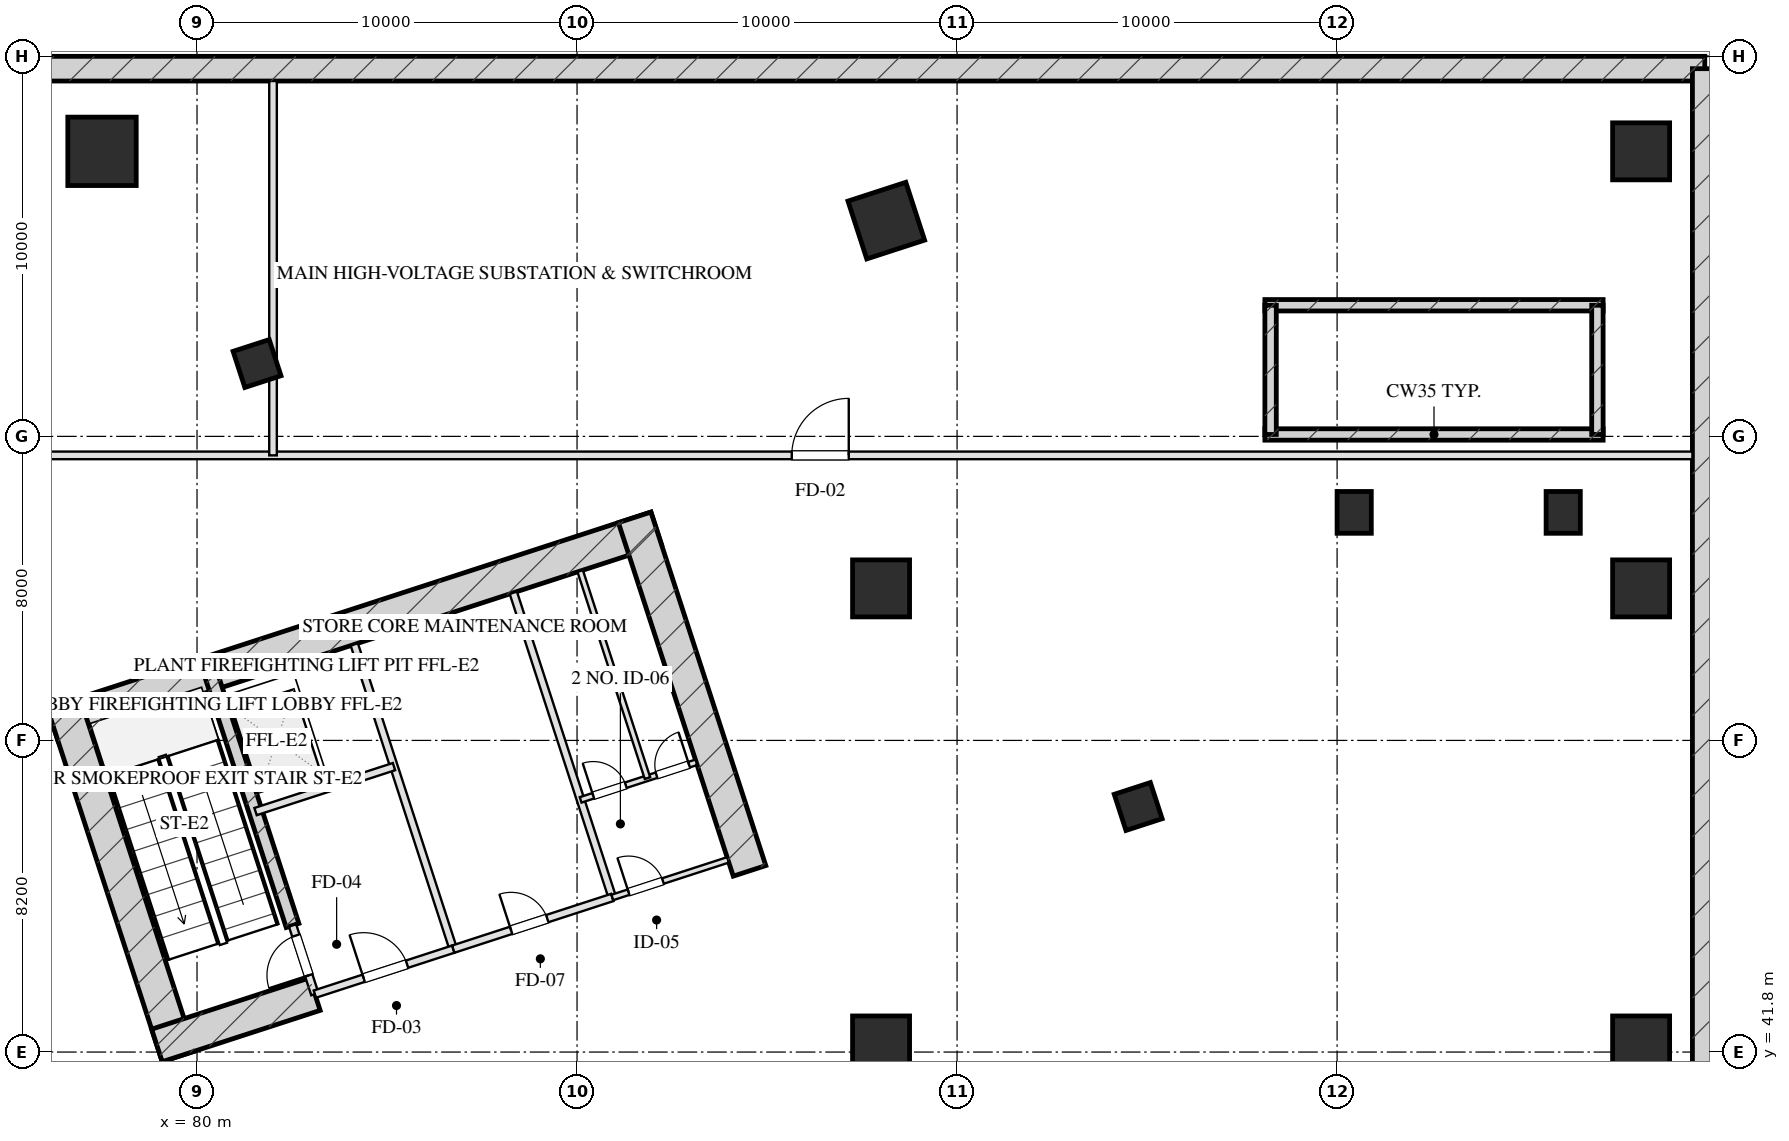
"""IFC4 building model, lengths in metres.
Left out: names, types, materials, properties, quantities, classifications, styles, units other than length and angle.
Written with IfcOpenShell. Run it as: python <this file> out.ifc"""

import sys

from ifc_helpers import new_model, si_unit, direction, frame, frame_2d, origin, origin_2d, place, context, subcontext, project, spatial, rectangle, hollow_rectangle, extrude, element, fill, save


model = new_model("IFC4")
c1 = context("Model", 3, precision=1e-05, world=origin(), true_north=direction((0.0, 1.0)))
c2 = subcontext(c1, "Body", "Model", "MODEL_VIEW")
j1 = project(units=[si_unit("LENGTHUNIT", "METRE"), si_unit("PLANEANGLEUNIT", "RADIAN")], contexts=[c1])
p1 = place(None, origin())
s1 = spatial("IfcSite", under=j1, at=p1, CompositionType="ELEMENT")
p2 = place(p1, origin())
s2 = spatial("IfcBuilding", under=s1, at=p2, CompositionType="ELEMENT")
p3 = place(p2, frame((0.0, 0.0, -12.0)))
s3 = spatial("IfcBuildingStorey", under=s2, at=p3, CompositionType="ELEMENT", Elevation=-12.0)
p4 = place(p3, frame((76.201, 50.419, 0.0), z_axis=(0.0, 0.0, 1.0), x_axis=(0.951056412142, 0.309017314926, 0.0)))
e1 = element("IfcWall", 1, at=p4, inside=s3, PredefinedType="SHEAR", context=c2, shape_type="SweptSolid", body=[
    extrude(rectangle(XDim=16.7, YDim=0.9, at=frame_2d((8.35, 0.0))), origin(), (0.0, 0.0, 1.0), 6.0),
])
for number, where, z_axis, x_axis in (
    (2, (79.512, 41.685, 0.0), (0.0, 0.0, 1.0), (-0.309, 0.951, 0.0)),
    (3, (94.539, 46.568, 0.0), (0.0, 0.0, 1.0), (-0.309, 0.951, 0.0)),
):
    element("IfcWall", number, at=place(p3, frame(where, z_axis=z_axis, x_axis=x_axis)), inside=s3, PredefinedType="SHEAR", context=c2, shape_type="SweptSolid", body=[
        extrude(rectangle(XDim=9.78, YDim=0.9, at=frame_2d((4.89, 0.0))), origin(), (0.0, 0.0, 1.0), 6.0),
    ])
p5 = place(p3, frame((82.514, 45.131, 0.0), z_axis=(0.0, 0.0, 1.0), x_axis=(-0.308988790936, 0.951065679686, 0.0)))
e4 = element("IfcWall", 4, at=p5, inside=s3, PredefinedType="SHEAR", context=c2, shape_type="SweptSolid", body=[
    extrude(rectangle(XDim=6.98, YDim=0.35, at=frame_2d((3.49, 0.0))), origin(), (0.0, 0.0, 1.0), 6.0),
])
p6 = place(p3, frame((78.945, 41.974, 0.0), z_axis=(0.0, 0.0, 1.0), x_axis=(0.951058289404, 0.309011537255, 0.0)))
e5 = element("IfcWall", 5, at=p6, inside=s3, PredefinedType="SHEAR", context=c2, shape_type="SweptSolid", body=[
    extrude(rectangle(XDim=4.37, YDim=0.9, at=frame_2d((2.185, 0.0))), origin(), (0.0, 0.0, 1.0), 6.0),
])
for number, where, z_axis, x_axis in (
    (6, (108.1, 58.05, 0.0), (0.0, 0.0, 1.0), (1.0, 0.0, 0.0)),
    (7, (108.1, 61.45, 0.0), (0.0, 0.0, 1.0), (1.0, 0.0, 0.0)),
):
    element("IfcWall", number, at=place(p3, frame(where, z_axis=z_axis, x_axis=x_axis)), inside=s3, PredefinedType="SHEAR", context=c2, shape_type="SweptSolid", body=[
        extrude(rectangle(XDim=8.9, YDim=0.3, at=frame_2d((4.45, 0.0))), origin(), (0.0, 0.0, 1.0), 6.0),
    ])
for number, where, z_axis, x_axis in (
    (8, (116.85, 58.05, 0.0), (0.0, 0.0, 1.0), (0.0, 1.0, 0.0)),
    (9, (108.25, 58.05, 0.0), (0.0, 0.0, 1.0), (0.0, 1.0, 0.0)),
):
    element("IfcWall", number, at=place(p3, frame(where, z_axis=z_axis, x_axis=x_axis)), inside=s3, PredefinedType="SHEAR", context=c2, shape_type="SweptSolid", body=[
        extrude(rectangle(XDim=3.4, YDim=0.3, at=frame_2d((1.7, 0.0))), origin(), (0.0, 0.0, 1.0), 6.0),
    ])
p7 = place(p3, frame((0.325, 67.675, 0.0), z_axis=(0.0, 0.0, 1.0), x_axis=(1.0, 0.0, 0.0)))
e10 = element("IfcWall", 10, at=p7, inside=s3, PredefinedType="SHEAR", context=c2, shape_type="SweptSolid", body=[
    extrude(rectangle(XDim=119.35, YDim=0.65, at=frame_2d((59.675, 0.0))), origin(), (0.0, 0.0, 1.0), 6.0),
])
p8 = place(p3, frame((119.675, 0.325, 0.0), z_axis=(0.0, 0.0, 1.0), x_axis=(0.0, 1.0, 0.0)))
e11 = element("IfcWall", 11, at=p8, inside=s3, PredefinedType="SHEAR", context=c2, shape_type="SweptSolid", body=[
    extrude(rectangle(XDim=67.35, YDim=0.65, at=frame_2d((33.675, 0.0))), origin(), (0.0, 0.0, 1.0), 6.0),
])
for number, where, z_axis, x_axis in (
    (12, (110.45, 56.0, 0.0), (0.0, 0.0, 1.0), (1.0, 0.0, 0.0)),
    (13, (115.95, 56.0, 0.0), (0.0, 0.0, 1.0), (1.0, 0.0, 0.0)),
):
    element("IfcColumn", number, at=place(p3, frame(where, z_axis=z_axis, x_axis=x_axis)), inside=s3, PredefinedType="COLUMN", context=c2, shape_type="SweptSolid", body=[
        extrude(rectangle(XDim=0.9, YDim=1.1, at=origin_2d()), origin(), (0.0, 0.0, 1.0), 5.65),
    ])
p9 = place(p3, frame((77.5, 65.5, 0.0), z_axis=(0.0, 0.0, 1.0), x_axis=(1.0, 0.0, 0.0)))
e14 = element("IfcColumn", 14, at=p9, inside=s3, PredefinedType="COLUMN", context=c2, shape_type="SweptSolid", body=[
    extrude(hollow_rectangle(XDim=1.8, YDim=1.8, WallThickness=0.06, at=origin_2d()), origin(), (0.0, 0.0, 1.0), 6.001),
])
for number, where, z_axis, x_axis in (
    (15, (98.0, 42.0, 0.0), (0.0, 0.0, 1.0), (1.0, 0.0, 0.0)),
    (16, (98.0, 54.0, 0.0), (0.0, 0.0, 1.0), (1.0, 0.0, 0.0)),
    (17, (118.0, 42.0, 0.0), (0.0, 0.0, 1.0), (1.0, 0.0, 0.0)),
    (18, (118.0, 54.0, 0.0), (0.0, 0.0, 1.0), (1.0, 0.0, 0.0)),
    (19, (118.0, 65.5, 0.0), (0.0, 0.0, 1.0), (1.0, 0.0, 0.0)),
):
    element("IfcColumn", number, at=place(p3, frame(where, z_axis=z_axis, x_axis=x_axis)), inside=s3, PredefinedType="COLUMN", context=c2, shape_type="SweptSolid", body=[
        extrude(rectangle(XDim=1.5, YDim=1.5, at=origin_2d()), origin(), (0.0, 0.0, 1.0), 6.001),
    ])
p10 = place(p3, frame((98.137, 63.677, 0.0), z_axis=(0.0, 0.0, 1.0), x_axis=(0.951056516295, 0.309016994375, 0.0)))
e20 = element("IfcColumn", 20, at=p10, inside=s3, PredefinedType="COLUMN", context=c2, shape_type="SweptSolid", body=[
    extrude(hollow_rectangle(XDim=1.6, YDim=1.6, WallThickness=0.055, at=origin_2d()), origin(), (0.0, 0.0, 1.0), 6.001),
])
for number, where, z_axis, x_axis in (
    (21, (104.766, 48.261, 0.0), (0.0, 0.0, 1.0), (0.951, 0.309, 0.0)),
    (22, (81.579, 59.916, 0.0), (0.0, 0.0, 1.0), (0.951, 0.309, 0.0)),
):
    element("IfcColumn", number, at=place(p3, frame(where, z_axis=z_axis, x_axis=x_axis)), inside=s3, PredefinedType="COLUMN", context=c2, shape_type="SweptSolid", body=[
        extrude(hollow_rectangle(XDim=1.0, YDim=1.0, WallThickness=0.036, at=origin_2d()), origin(), (0.0, 0.0, 1.0), 6.001),
    ])
p11 = place(p3, frame((83.101, 43.324, 0.0), z_axis=(0.0, 0.0, 1.0), x_axis=(-0.309048298632, 0.951046344356, 0.0)))
e23 = element("IfcWall", 23, at=p11, inside=s3, PredefinedType="PARTITIONING", context=c2, shape_type="SweptSolid", body=[
    extrude(rectangle(XDim=1.9, YDim=0.2, at=frame_2d((0.95, 0.0))), origin(), (0.0, 0.0, 1.0), 5.635),
])
p12 = place(p11, frame((0.52, 0.0, 0.0)))
e24 = element("IfcOpeningElement", 24, at=p12, cuts=e23, PredefinedType="OPENING", context=c2, shape_type="SweptSolid", body=[
    extrude(rectangle(XDim=1.1, YDim=2.05, at=frame_2d((0.55, 1.025))), frame((0.0, 0.11, 0.0), z_axis=(0.0, -1.0, 0.0), x_axis=(1.0, 0.0, 0.0)), (0.0, 0.0, 1.0), 0.22),
])
p13 = place(p3, frame((86.743, 44.508, 0.0), z_axis=(0.0, 0.0, 1.0), x_axis=(-0.309016001439, 0.951056838919, 0.0)))
e25 = element("IfcWall", 25, at=p13, inside=s3, PredefinedType="PARTITIONING", context=c2, shape_type="SweptSolid", body=[
    extrude(rectangle(XDim=8.43, YDim=0.2, at=frame_2d((4.215, 0.0))), origin(), (0.0, 0.0, 1.0), 5.635),
])
p14 = place(p3, frame((83.101, 43.324, 0.0), z_axis=(0.0, 0.0, 1.0), x_axis=(0.951052804469, 0.309028417967, 0.0)))
e26 = element("IfcWall", 26, at=p14, inside=s3, PredefinedType="PARTITIONING", context=c2, shape_type="SweptSolid", body=[
    extrude(rectangle(XDim=3.83, YDim=0.2, at=frame_2d((1.915, 0.0))), origin(), (0.0, 0.0, 1.0), 5.635),
])
p15 = place(p14, frame((1.35, 0.0, 0.0)))
e27 = element("IfcOpeningElement", 27, at=p15, cuts=e26, PredefinedType="OPENING", context=c2, shape_type="SweptSolid", body=[
    extrude(rectangle(XDim=1.2, YDim=2.05, at=frame_2d((0.6, 1.025))), frame((0.0, 0.11, 0.0), z_axis=(0.0, -1.0, 0.0), x_axis=(1.0, 0.0, 0.0)), (0.0, 0.0, 1.0), 0.22),
])
p16 = place(p3, frame((81.54, 48.127, 0.0), z_axis=(0.0, 0.0, 1.0), x_axis=(0.951062257173, 0.308999325213, 0.0)))
e28 = element("IfcWall", 28, at=p16, inside=s3, PredefinedType="PARTITIONING", context=c2, shape_type="SweptSolid", body=[
    extrude(rectangle(XDim=2.1, YDim=0.2, at=frame_2d((1.05, 0.0))), origin(), (0.0, 0.0, 1.0), 5.635),
])
p17 = place(p3, frame((83.538, 48.776, 0.0), z_axis=(0.0, 0.0, 1.0), x_axis=(0.951041328149, 0.309063734775, 0.0)))
e29 = element("IfcWall", 29, at=p17, inside=s3, PredefinedType="PARTITIONING", context=c2, shape_type="SweptSolid", body=[
    extrude(rectangle(XDim=1.73, YDim=0.2, at=frame_2d((0.865, 0.0))), origin(), (0.0, 0.0, 1.0), 5.635),
])
p18 = place(p3, frame((90.928, 45.868, 0.0), z_axis=(0.0, 0.0, 1.0), x_axis=(-0.309042196757, 0.951048327176, 0.0)))
e30 = element("IfcWall", 30, at=p18, inside=s3, PredefinedType="PARTITIONING", context=c2, shape_type="SweptSolid", body=[
    extrude(rectangle(XDim=8.43, YDim=0.2, at=frame_2d((4.215, 0.0))), origin(), (0.0, 0.0, 1.0), 5.635),
])
p19 = place(p3, frame((86.743, 44.508, 0.0), z_axis=(0.0, 0.0, 1.0), x_axis=(0.951063829732, 0.308994485023, 0.0)))
e31 = element("IfcWall", 31, at=p19, inside=s3, PredefinedType="PARTITIONING", context=c2, shape_type="SweptSolid", body=[
    extrude(rectangle(XDim=4.4, YDim=0.2, at=frame_2d((2.2, 0.0))), origin(), (0.0, 0.0, 1.0), 5.635),
])
p20 = place(p19, frame((1.6, 0.0, 0.0)))
e32 = element("IfcOpeningElement", 32, at=p20, cuts=e31, PredefinedType="OPENING", context=c2, shape_type="SweptSolid", body=[
    extrude(rectangle(XDim=1.0, YDim=2.05, at=frame_2d((0.5, 1.025))), frame((0.0, 0.11, 0.0), z_axis=(0.0, -1.0, 0.0), x_axis=(1.0, 0.0, 0.0)), (0.0, 0.0, 1.0), 0.22),
])
p21 = place(p3, frame((90.928, 45.868, 0.0), z_axis=(0.0, 0.0, 1.0), x_axis=(0.951059297078, 0.309008435874, 0.0)))
e33 = element("IfcWall", 33, at=p21, inside=s3, PredefinedType="PARTITIONING", context=c2, shape_type="SweptSolid", body=[
    extrude(rectangle(XDim=3.2, YDim=0.15, at=frame_2d((1.6, 0.0))), origin(), (0.0, 0.0, 1.0), 5.635),
])
p22 = place(p21, frame((0.45, 0.0, 0.0)))
e34 = element("IfcOpeningElement", 34, at=p22, cuts=e33, PredefinedType="OPENING", context=c2, shape_type="SweptSolid", body=[
    extrude(rectangle(XDim=0.95, YDim=2.05, at=frame_2d((0.475, 1.025))), frame((0.0, 0.085, 0.0), z_axis=(0.0, -1.0, 0.0), x_axis=(1.0, 0.0, 0.0)), (0.0, 0.0, 1.0), 0.17),
])
p23 = place(p3, frame((90.094, 48.436, 0.0), z_axis=(0.0, 0.0, 1.0), x_axis=(0.951066581729, 0.308986014439, 0.0)))
e35 = element("IfcWall", 35, at=p23, inside=s3, PredefinedType="PARTITIONING", context=c2, shape_type="SweptSolid", body=[
    extrude(rectangle(XDim=3.2, YDim=0.15, at=frame_2d((1.6, 0.0))), origin(), (0.0, 0.0, 1.0), 5.635),
])
p24 = place(p23, frame((0.35, 0.0, 0.0)))
e36 = element("IfcOpeningElement", 36, at=p24, cuts=e35, PredefinedType="OPENING", context=c2, shape_type="SweptSolid", body=[
    extrude(rectangle(XDim=0.9, YDim=2.05, at=frame_2d((0.45, 1.025))), frame((0.0, 0.085, 0.0), z_axis=(0.0, -1.0, 0.0), x_axis=(1.0, 0.0, 0.0)), (0.0, 0.0, 1.0), 0.17),
])
p25 = place(p23, frame((2.1, 0.0, 0.0)))
e37 = element("IfcOpeningElement", 37, at=p25, cuts=e35, PredefinedType="OPENING", context=c2, shape_type="SweptSolid", body=[
    extrude(rectangle(XDim=0.9, YDim=2.05, at=frame_2d((0.45, 1.025))), frame((0.0, 0.085, 0.0), z_axis=(0.0, -1.0, 0.0), x_axis=(1.0, 0.0, 0.0)), (0.0, 0.0, 1.0), 0.17),
])
p26 = place(p3, frame((91.853, 49.007, 0.0), z_axis=(0.0, 0.0, 1.0), x_axis=(-0.309022487551, 0.951054731437, 0.0)))
e38 = element("IfcWall", 38, at=p26, inside=s3, PredefinedType="PARTITIONING", context=c2, shape_type="SweptSolid", body=[
    extrude(rectangle(XDim=5.73, YDim=0.15, at=frame_2d((2.865, 0.0))), origin(), (0.0, 0.0, 1.0), 5.635),
])
p27 = place(p3, frame((0.65, 57.5, 0.0), z_axis=(0.0, 0.0, 1.0), x_axis=(1.0, 0.0, 0.0)))
e39 = element("IfcWall", 39, at=p27, inside=s3, PredefinedType="PARTITIONING", context=c2, shape_type="SweptSolid", body=[
    extrude(rectangle(XDim=118.7, YDim=0.2, at=frame_2d((59.35, 0.0))), origin(), (0.0, 0.0, 1.0), 5.635),
])
p28 = place(p27, frame((16.0, 0.0, 0.0)))
e40 = element("IfcOpeningElement", 40, at=p28, cuts=e39, PredefinedType="OPENING", context=c2, shape_type="SweptSolid", body=[
    extrude(rectangle(XDim=1.5, YDim=2.05, at=frame_2d((0.75, 1.025))), frame((0.0, 0.11, 0.0), z_axis=(0.0, -1.0, 0.0), x_axis=(1.0, 0.0, 0.0)), (0.0, 0.0, 1.0), 0.22),
])
p29 = place(p27, frame((56.0, 0.0, 0.0)))
e41 = element("IfcOpeningElement", 41, at=p29, cuts=e39, PredefinedType="OPENING", context=c2, shape_type="SweptSolid", body=[
    extrude(rectangle(XDim=1.5, YDim=2.05, at=frame_2d((0.75, 1.025))), frame((0.0, 0.11, 0.0), z_axis=(0.0, -1.0, 0.0), x_axis=(1.0, 0.0, 0.0)), (0.0, 0.0, 1.0), 0.22),
])
p30 = place(p27, frame((95.0, 0.0, 0.0)))
e42 = element("IfcOpeningElement", 42, at=p30, cuts=e39, PredefinedType="OPENING", context=c2, shape_type="SweptSolid", body=[
    extrude(rectangle(XDim=1.5, YDim=2.05, at=frame_2d((0.75, 1.025))), frame((0.0, 0.11, 0.0), z_axis=(0.0, -1.0, 0.0), x_axis=(1.0, 0.0, 0.0)), (0.0, 0.0, 1.0), 0.22),
])
p31 = place(p3, frame((82.0, 57.5, 0.0), z_axis=(0.0, 0.0, 1.0), x_axis=(0.0, 1.0, 0.0)))
e43 = element("IfcWall", 43, at=p31, inside=s3, PredefinedType="PARTITIONING", context=c2, shape_type="SweptSolid", body=[
    extrude(rectangle(XDim=9.85, YDim=0.2, at=frame_2d((4.925, 0.0))), origin(), (0.0, 0.0, 1.0), 5.635),
])
p32 = place(p12, origin())
e44 = element("IfcDoor", 44, at=p32, inside=s3, OperationType="SINGLE_SWING_LEFT", PredefinedType="DOOR", context=c2, shape_type="SweptSolid", body=[
    extrude(rectangle(XDim=1.1, YDim=2.05, at=frame_2d((0.55, 1.025))), frame((0.0, 0.025, 0.0), z_axis=(0.0, -1.0, 0.0), x_axis=(1.0, 0.0, 0.0)), (0.0, 0.0, 1.0), 0.05),
])
fill(e24, e44)
p33 = place(p15, origin())
e45 = element("IfcDoor", 45, at=p33, inside=s3, OperationType="SINGLE_SWING_LEFT", PredefinedType="DOOR", context=c2, shape_type="SweptSolid", body=[
    extrude(rectangle(XDim=1.2, YDim=2.05, at=frame_2d((0.6, 1.025))), frame((0.0, 0.025, 0.0), z_axis=(0.0, -1.0, 0.0), x_axis=(1.0, 0.0, 0.0)), (0.0, 0.0, 1.0), 0.05),
])
fill(e27, e45)
p34 = place(p20, origin())
e46 = element("IfcDoor", 46, at=p34, inside=s3, OperationType="SINGLE_SWING_LEFT", PredefinedType="DOOR", context=c2, shape_type="SweptSolid", body=[
    extrude(rectangle(XDim=1.0, YDim=2.05, at=frame_2d((0.5, 1.025))), frame((0.0, 0.025, 0.0), z_axis=(0.0, -1.0, 0.0), x_axis=(1.0, 0.0, 0.0)), (0.0, 0.0, 1.0), 0.05),
])
fill(e32, e46)
p35 = place(p22, origin())
e47 = element("IfcDoor", 47, at=p35, inside=s3, OperationType="SINGLE_SWING_LEFT", PredefinedType="DOOR", context=c2, shape_type="SweptSolid", body=[
    extrude(rectangle(XDim=0.95, YDim=2.05, at=frame_2d((0.475, 1.025))), frame((0.0, 0.025, 0.0), z_axis=(0.0, -1.0, 0.0), x_axis=(1.0, 0.0, 0.0)), (0.0, 0.0, 1.0), 0.05),
])
fill(e34, e47)
p36 = place(p24, origin())
e48 = element("IfcDoor", 48, at=p36, inside=s3, OperationType="SINGLE_SWING_LEFT", PredefinedType="DOOR", context=c2, shape_type="SweptSolid", body=[
    extrude(rectangle(XDim=0.9, YDim=2.05, at=frame_2d((0.45, 1.025))), frame((0.0, 0.025, 0.0), z_axis=(0.0, -1.0, 0.0), x_axis=(1.0, 0.0, 0.0)), (0.0, 0.0, 1.0), 0.05),
])
fill(e36, e48)
p37 = place(p25, origin())
e49 = element("IfcDoor", 49, at=p37, inside=s3, OperationType="SINGLE_SWING_RIGHT", PredefinedType="DOOR", context=c2, shape_type="SweptSolid", body=[
    extrude(rectangle(XDim=0.9, YDim=2.05, at=frame_2d((0.45, 1.025))), frame((0.0, 0.025, 0.0), z_axis=(0.0, -1.0, 0.0), x_axis=(1.0, 0.0, 0.0)), (0.0, 0.0, 1.0), 0.05),
])
fill(e37, e49)
p38 = place(p30, origin())
e50 = element("IfcDoor", 50, at=p38, inside=s3, OperationType="SINGLE_SWING_RIGHT", PredefinedType="DOOR", context=c2, shape_type="SweptSolid", body=[
    extrude(rectangle(XDim=1.5, YDim=2.05, at=frame_2d((0.75, 1.025))), frame((0.0, 0.025, 0.0), z_axis=(0.0, -1.0, 0.0), x_axis=(1.0, 0.0, 0.0)), (0.0, 0.0, 1.0), 0.05),
])
fill(e42, e50)
save(model, sys.argv[1])
